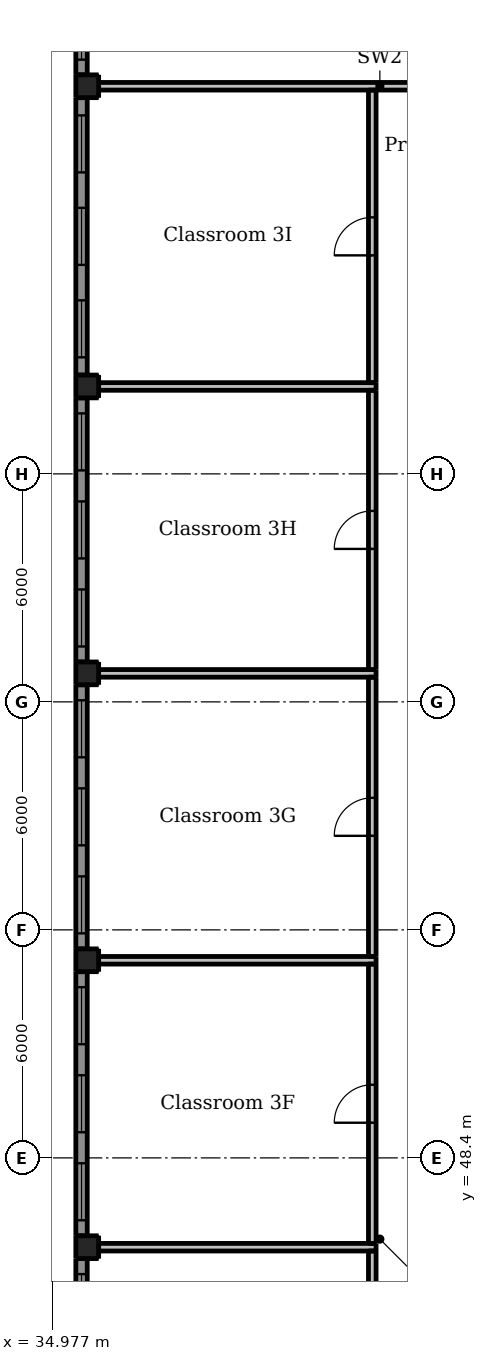
"""IFC4 building model, lengths in metres.
Left out: names, types, materials, properties, quantities, classifications, styles, units other than length and angle.
Written with IfcOpenShell. Run it as: python <this file> out.ifc"""

import sys

from ifc_helpers import new_model, si_unit, direction, frame, frame_2d, origin, origin_2d, place, context, subcontext, project, spatial, rectangle, extrude, element, fill, save


model = new_model("IFC4")
c1 = context("Model", 3, precision=1e-05, world=origin(), true_north=direction((0.0, 1.0)))
c2 = subcontext(c1, "Body", "Model", "MODEL_VIEW")
j1 = project(units=[si_unit("LENGTHUNIT", "METRE"), si_unit("PLANEANGLEUNIT", "RADIAN")], contexts=[c1])
p1 = place(None, origin())
s1 = spatial("IfcSite", under=j1, at=p1, CompositionType="ELEMENT")
p2 = place(p1, origin())
s2 = spatial("IfcBuilding", under=s1, at=p2, CompositionType="ELEMENT")
p3 = place(p2, frame((0.0, 0.0, 14.5)))
s3 = spatial("IfcBuildingStorey", under=s2, at=p3, CompositionType="ELEMENT", Elevation=14.5)
for number, where, z_axis, x_axis in (
    (1, (35.9, 46.05, -0.3), (0.0, 0.0, 1.0), (1.0, 0.0, 0.0)),
    (2, (35.9, 53.6, -0.3), (0.0, 0.0, 1.0), (1.0, 0.0, 0.0)),
    (3, (35.9, 61.15, -0.3), (0.0, 0.0, 1.0), (1.0, 0.0, 0.0)),
    (4, (35.9, 68.7, -0.3), (0.0, 0.0, 1.0), (1.0, 0.0, 0.0)),
    (5, (35.9, 76.6, -0.3), (0.0, 0.0, 1.0), (1.0, 0.0, 0.0)),
):
    element("IfcColumn", number, at=place(p3, frame(where, z_axis=z_axis, x_axis=x_axis)), inside=s3, PredefinedType="COLUMN", context=c2, shape_type="SweptSolid", body=[
        extrude(rectangle(XDim=0.6, YDim=0.6, at=origin_2d()), origin(), (0.0, 0.0, 1.0), 4.5),
    ])
p4 = place(p3, frame((35.75, 38.8, 0.0), z_axis=(0.0, 0.0, 1.0), x_axis=(0.0, 1.0, 0.0)))
e6 = element("IfcWall", 6, at=p4, inside=s3, PredefinedType="SOLIDWALL", context=c2, shape_type="SweptSolid", body=[
    extrude(rectangle(XDim=6.95, YDim=0.3, at=frame_2d((3.475, 0.0))), origin(), (0.0, 0.0, 1.0), 3.3),
])
p5 = place(p4, frame((0.408, 0.0, 0.9)))
e7 = element("IfcOpeningElement", 7, at=p5, cuts=e6, PredefinedType="OPENING", context=c2, shape_type="SweptSolid", body=[
    extrude(rectangle(XDim=1.5, YDim=1.5, at=frame_2d((0.75, 0.75))), frame((0.0, 0.16, 0.0), z_axis=(0.0, -1.0, 0.0), x_axis=(1.0, 0.0, 0.0)), (0.0, 0.0, 1.0), 0.32),
])
p6 = place(p4, frame((2.725, 0.0, 0.9)))
e8 = element("IfcOpeningElement", 8, at=p6, cuts=e6, PredefinedType="OPENING", context=c2, shape_type="SweptSolid", body=[
    extrude(rectangle(XDim=1.5, YDim=1.5, at=frame_2d((0.75, 0.75))), frame((0.0, 0.16, 0.0), z_axis=(0.0, -1.0, 0.0), x_axis=(1.0, 0.0, 0.0)), (0.0, 0.0, 1.0), 0.32),
])
p7 = place(p4, frame((5.042, 0.0, 0.9)))
e9 = element("IfcOpeningElement", 9, at=p7, cuts=e6, PredefinedType="OPENING", context=c2, shape_type="SweptSolid", body=[
    extrude(rectangle(XDim=1.5, YDim=1.5, at=frame_2d((0.75, 0.75))), frame((0.0, 0.16, 0.0), z_axis=(0.0, -1.0, 0.0), x_axis=(1.0, 0.0, 0.0)), (0.0, 0.0, 1.0), 0.32),
])
p8 = place(p3, frame((35.75, 46.35, 0.0), z_axis=(0.0, 0.0, 1.0), x_axis=(0.0, 1.0, 0.0)))
e10 = element("IfcWall", 10, at=p8, inside=s3, PredefinedType="SOLIDWALL", context=c2, shape_type="SweptSolid", body=[
    extrude(rectangle(XDim=6.95, YDim=0.3, at=frame_2d((3.475, 0.0))), origin(), (0.0, 0.0, 1.0), 3.3),
])
p9 = place(p8, frame((0.408, 0.0, 0.9)))
e11 = element("IfcOpeningElement", 11, at=p9, cuts=e10, PredefinedType="OPENING", context=c2, shape_type="SweptSolid", body=[
    extrude(rectangle(XDim=1.5, YDim=1.5, at=frame_2d((0.75, 0.75))), frame((0.0, 0.16, 0.0), z_axis=(0.0, -1.0, 0.0), x_axis=(1.0, 0.0, 0.0)), (0.0, 0.0, 1.0), 0.32),
])
p10 = place(p8, frame((2.725, 0.0, 0.9)))
e12 = element("IfcOpeningElement", 12, at=p10, cuts=e10, PredefinedType="OPENING", context=c2, shape_type="SweptSolid", body=[
    extrude(rectangle(XDim=1.5, YDim=1.5, at=frame_2d((0.75, 0.75))), frame((0.0, 0.16, 0.0), z_axis=(0.0, -1.0, 0.0), x_axis=(1.0, 0.0, 0.0)), (0.0, 0.0, 1.0), 0.32),
])
p11 = place(p8, frame((5.042, 0.0, 0.9)))
e13 = element("IfcOpeningElement", 13, at=p11, cuts=e10, PredefinedType="OPENING", context=c2, shape_type="SweptSolid", body=[
    extrude(rectangle(XDim=1.5, YDim=1.5, at=frame_2d((0.75, 0.75))), frame((0.0, 0.16, 0.0), z_axis=(0.0, -1.0, 0.0), x_axis=(1.0, 0.0, 0.0)), (0.0, 0.0, 1.0), 0.32),
])
p12 = place(p3, frame((35.75, 53.9, 0.0), z_axis=(0.0, 0.0, 1.0), x_axis=(0.0, 1.0, 0.0)))
e14 = element("IfcWall", 14, at=p12, inside=s3, PredefinedType="SOLIDWALL", context=c2, shape_type="SweptSolid", body=[
    extrude(rectangle(XDim=6.95, YDim=0.3, at=frame_2d((3.475, 0.0))), origin(), (0.0, 0.0, 1.0), 3.3),
])
p13 = place(p12, frame((0.408, 0.0, 0.9)))
e15 = element("IfcOpeningElement", 15, at=p13, cuts=e14, PredefinedType="OPENING", context=c2, shape_type="SweptSolid", body=[
    extrude(rectangle(XDim=1.5, YDim=1.5, at=frame_2d((0.75, 0.75))), frame((0.0, 0.16, 0.0), z_axis=(0.0, -1.0, 0.0), x_axis=(1.0, 0.0, 0.0)), (0.0, 0.0, 1.0), 0.32),
])
p14 = place(p12, frame((2.725, 0.0, 0.9)))
e16 = element("IfcOpeningElement", 16, at=p14, cuts=e14, PredefinedType="OPENING", context=c2, shape_type="SweptSolid", body=[
    extrude(rectangle(XDim=1.5, YDim=1.5, at=frame_2d((0.75, 0.75))), frame((0.0, 0.16, 0.0), z_axis=(0.0, -1.0, 0.0), x_axis=(1.0, 0.0, 0.0)), (0.0, 0.0, 1.0), 0.32),
])
p15 = place(p12, frame((5.042, 0.0, 0.9)))
e17 = element("IfcOpeningElement", 17, at=p15, cuts=e14, PredefinedType="OPENING", context=c2, shape_type="SweptSolid", body=[
    extrude(rectangle(XDim=1.5, YDim=1.5, at=frame_2d((0.75, 0.75))), frame((0.0, 0.16, 0.0), z_axis=(0.0, -1.0, 0.0), x_axis=(1.0, 0.0, 0.0)), (0.0, 0.0, 1.0), 0.32),
])
p16 = place(p3, frame((35.75, 61.45, 0.0), z_axis=(0.0, 0.0, 1.0), x_axis=(0.0, 1.0, 0.0)))
e18 = element("IfcWall", 18, at=p16, inside=s3, PredefinedType="SOLIDWALL", context=c2, shape_type="SweptSolid", body=[
    extrude(rectangle(XDim=6.95, YDim=0.3, at=frame_2d((3.475, 0.0))), origin(), (0.0, 0.0, 1.0), 3.3),
])
p17 = place(p16, frame((0.408, 0.0, 0.9)))
e19 = element("IfcOpeningElement", 19, at=p17, cuts=e18, PredefinedType="OPENING", context=c2, shape_type="SweptSolid", body=[
    extrude(rectangle(XDim=1.5, YDim=1.5, at=frame_2d((0.75, 0.75))), frame((0.0, 0.16, 0.0), z_axis=(0.0, -1.0, 0.0), x_axis=(1.0, 0.0, 0.0)), (0.0, 0.0, 1.0), 0.32),
])
p18 = place(p16, frame((2.725, 0.0, 0.9)))
e20 = element("IfcOpeningElement", 20, at=p18, cuts=e18, PredefinedType="OPENING", context=c2, shape_type="SweptSolid", body=[
    extrude(rectangle(XDim=1.5, YDim=1.5, at=frame_2d((0.75, 0.75))), frame((0.0, 0.16, 0.0), z_axis=(0.0, -1.0, 0.0), x_axis=(1.0, 0.0, 0.0)), (0.0, 0.0, 1.0), 0.32),
])
p19 = place(p16, frame((5.042, 0.0, 0.9)))
e21 = element("IfcOpeningElement", 21, at=p19, cuts=e18, PredefinedType="OPENING", context=c2, shape_type="SweptSolid", body=[
    extrude(rectangle(XDim=1.5, YDim=1.5, at=frame_2d((0.75, 0.75))), frame((0.0, 0.16, 0.0), z_axis=(0.0, -1.0, 0.0), x_axis=(1.0, 0.0, 0.0)), (0.0, 0.0, 1.0), 0.32),
])
p20 = place(p3, frame((35.75, 69.0, 0.0), z_axis=(0.0, 0.0, 1.0), x_axis=(0.0, 1.0, 0.0)))
e22 = element("IfcWall", 22, at=p20, inside=s3, PredefinedType="SOLIDWALL", context=c2, shape_type="SweptSolid", body=[
    extrude(rectangle(XDim=7.3, YDim=0.3, at=frame_2d((3.65, 0.0))), origin(), (0.0, 0.0, 1.0), 3.3),
])
p21 = place(p20, frame((0.467, 0.0, 0.9)))
e23 = element("IfcOpeningElement", 23, at=p21, cuts=e22, PredefinedType="OPENING", context=c2, shape_type="SweptSolid", body=[
    extrude(rectangle(XDim=1.5, YDim=1.5, at=frame_2d((0.75, 0.75))), frame((0.0, 0.16, 0.0), z_axis=(0.0, -1.0, 0.0), x_axis=(1.0, 0.0, 0.0)), (0.0, 0.0, 1.0), 0.32),
])
p22 = place(p20, frame((2.9, 0.0, 0.9)))
e24 = element("IfcOpeningElement", 24, at=p22, cuts=e22, PredefinedType="OPENING", context=c2, shape_type="SweptSolid", body=[
    extrude(rectangle(XDim=1.5, YDim=1.5, at=frame_2d((0.75, 0.75))), frame((0.0, 0.16, 0.0), z_axis=(0.0, -1.0, 0.0), x_axis=(1.0, 0.0, 0.0)), (0.0, 0.0, 1.0), 0.32),
])
p23 = place(p20, frame((5.333, 0.0, 0.9)))
e25 = element("IfcOpeningElement", 25, at=p23, cuts=e22, PredefinedType="OPENING", context=c2, shape_type="SweptSolid", body=[
    extrude(rectangle(XDim=1.5, YDim=1.5, at=frame_2d((0.75, 0.75))), frame((0.0, 0.16, 0.0), z_axis=(0.0, -1.0, 0.0), x_axis=(1.0, 0.0, 0.0)), (0.0, 0.0, 1.0), 0.32),
])
p24 = place(p3, frame((35.75, 76.9, 0.0), z_axis=(0.0, 0.0, 1.0), x_axis=(0.0, 1.0, 0.0)))
e26 = element("IfcWall", 26, at=p24, inside=s3, PredefinedType="SOLIDWALL", context=c2, shape_type="SweptSolid", body=[
    extrude(rectangle(XDim=6.9, YDim=0.3, at=frame_2d((3.45, 0.0))), origin(), (0.0, 0.0, 1.0), 3.3),
])
p25 = place(p24, frame((0.4, 0.0, 0.9)))
e27 = element("IfcOpeningElement", 27, at=p25, cuts=e26, PredefinedType="OPENING", context=c2, shape_type="SweptSolid", body=[
    extrude(rectangle(XDim=1.5, YDim=1.5, at=frame_2d((0.75, 0.75))), frame((0.0, 0.16, 0.0), z_axis=(0.0, -1.0, 0.0), x_axis=(1.0, 0.0, 0.0)), (0.0, 0.0, 1.0), 0.32),
])
p26 = place(p24, frame((2.7, 0.0, 0.9)))
e28 = element("IfcOpeningElement", 28, at=p26, cuts=e26, PredefinedType="OPENING", context=c2, shape_type="SweptSolid", body=[
    extrude(rectangle(XDim=1.5, YDim=1.5, at=frame_2d((0.75, 0.75))), frame((0.0, 0.16, 0.0), z_axis=(0.0, -1.0, 0.0), x_axis=(1.0, 0.0, 0.0)), (0.0, 0.0, 1.0), 0.32),
])
p27 = place(p24, frame((5.0, 0.0, 0.9)))
e29 = element("IfcOpeningElement", 29, at=p27, cuts=e26, PredefinedType="OPENING", context=c2, shape_type="SweptSolid", body=[
    extrude(rectangle(XDim=1.5, YDim=1.5, at=frame_2d((0.75, 0.75))), frame((0.0, 0.16, 0.0), z_axis=(0.0, -1.0, 0.0), x_axis=(1.0, 0.0, 0.0)), (0.0, 0.0, 1.0), 0.32),
])
p28 = place(p3, frame((43.4, 38.6, 0.0), z_axis=(0.0, 0.0, 1.0), x_axis=(0.0, 1.0, 0.0)))
e30 = element("IfcWall", 30, at=p28, inside=s3, PredefinedType="PARTITIONING", context=c2, shape_type="SweptSolid", body=[
    extrude(rectangle(XDim=7.35, YDim=0.2, at=frame_2d((3.675, 0.0))), origin(), (0.0, 0.0, 1.0), 3.1),
])
p29 = place(p28, frame((3.175, 0.0, 0.0)))
e31 = element("IfcOpeningElement", 31, at=p29, cuts=e30, PredefinedType="OPENING", context=c2, shape_type="SweptSolid", body=[
    extrude(rectangle(XDim=1.0, YDim=2.1, at=frame_2d((0.5, 1.05))), frame((0.0, 0.11, 0.0), z_axis=(0.0, -1.0, 0.0), x_axis=(1.0, 0.0, 0.0)), (0.0, 0.0, 1.0), 0.22),
])
p30 = place(p3, frame((43.4, 46.15, 0.0), z_axis=(0.0, 0.0, 1.0), x_axis=(0.0, 1.0, 0.0)))
e32 = element("IfcWall", 32, at=p30, inside=s3, PredefinedType="PARTITIONING", context=c2, shape_type="SweptSolid", body=[
    extrude(rectangle(XDim=7.35, YDim=0.2, at=frame_2d((3.675, 0.0))), origin(), (0.0, 0.0, 1.0), 3.1),
])
p31 = place(p30, frame((3.175, 0.0, 0.0)))
e33 = element("IfcOpeningElement", 33, at=p31, cuts=e32, PredefinedType="OPENING", context=c2, shape_type="SweptSolid", body=[
    extrude(rectangle(XDim=1.0, YDim=2.1, at=frame_2d((0.5, 1.05))), frame((0.0, 0.11, 0.0), z_axis=(0.0, -1.0, 0.0), x_axis=(1.0, 0.0, 0.0)), (0.0, 0.0, 1.0), 0.22),
])
p32 = place(p3, frame((43.4, 53.7, 0.0), z_axis=(0.0, 0.0, 1.0), x_axis=(0.0, 1.0, 0.0)))
e34 = element("IfcWall", 34, at=p32, inside=s3, PredefinedType="PARTITIONING", context=c2, shape_type="SweptSolid", body=[
    extrude(rectangle(XDim=7.35, YDim=0.2, at=frame_2d((3.675, 0.0))), origin(), (0.0, 0.0, 1.0), 3.1),
])
p33 = place(p32, frame((3.175, 0.0, 0.0)))
e35 = element("IfcOpeningElement", 35, at=p33, cuts=e34, PredefinedType="OPENING", context=c2, shape_type="SweptSolid", body=[
    extrude(rectangle(XDim=1.0, YDim=2.1, at=frame_2d((0.5, 1.05))), frame((0.0, 0.11, 0.0), z_axis=(0.0, -1.0, 0.0), x_axis=(1.0, 0.0, 0.0)), (0.0, 0.0, 1.0), 0.22),
])
p34 = place(p3, frame((43.4, 61.25, 0.0), z_axis=(0.0, 0.0, 1.0), x_axis=(0.0, 1.0, 0.0)))
e36 = element("IfcWall", 36, at=p34, inside=s3, PredefinedType="PARTITIONING", context=c2, shape_type="SweptSolid", body=[
    extrude(rectangle(XDim=7.35, YDim=0.2, at=frame_2d((3.675, 0.0))), origin(), (0.0, 0.0, 1.0), 3.1),
])
p35 = place(p34, frame((3.175, 0.0, 0.0)))
e37 = element("IfcOpeningElement", 37, at=p35, cuts=e36, PredefinedType="OPENING", context=c2, shape_type="SweptSolid", body=[
    extrude(rectangle(XDim=1.0, YDim=2.1, at=frame_2d((0.5, 1.05))), frame((0.0, 0.11, 0.0), z_axis=(0.0, -1.0, 0.0), x_axis=(1.0, 0.0, 0.0)), (0.0, 0.0, 1.0), 0.22),
])
p36 = place(p3, frame((43.4, 68.8, 0.0), z_axis=(0.0, 0.0, 1.0), x_axis=(0.0, 1.0, 0.0)))
e38 = element("IfcWall", 38, at=p36, inside=s3, PredefinedType="PARTITIONING", context=c2, shape_type="SweptSolid", body=[
    extrude(rectangle(XDim=7.7, YDim=0.2, at=frame_2d((3.85, 0.0))), origin(), (0.0, 0.0, 1.0), 3.1),
])
p37 = place(p36, frame((3.35, 0.0, 0.0)))
e39 = element("IfcOpeningElement", 39, at=p37, cuts=e38, PredefinedType="OPENING", context=c2, shape_type="SweptSolid", body=[
    extrude(rectangle(XDim=1.0, YDim=2.1, at=frame_2d((0.5, 1.05))), frame((0.0, 0.11, 0.0), z_axis=(0.0, -1.0, 0.0), x_axis=(1.0, 0.0, 0.0)), (0.0, 0.0, 1.0), 0.22),
])
for number, where, z_axis, x_axis in (
    (40, (36.2, 46.05, 0.0), (0.0, 0.0, 1.0), (1.0, 0.0, 0.0)),
    (41, (36.2, 53.6, 0.0), (0.0, 0.0, 1.0), (1.0, 0.0, 0.0)),
    (42, (36.2, 61.15, 0.0), (0.0, 0.0, 1.0), (1.0, 0.0, 0.0)),
    (43, (36.2, 68.7, 0.0), (0.0, 0.0, 1.0), (1.0, 0.0, 0.0)),
):
    element("IfcWall", number, at=place(p3, frame(where, z_axis=z_axis, x_axis=x_axis)), inside=s3, PredefinedType="PARTITIONING", context=c2, shape_type="SweptSolid", body=[
        extrude(rectangle(XDim=7.3, YDim=0.2, at=frame_2d((3.65, 0.0))), origin(), (0.0, 0.0, 1.0), 3.1),
    ])
p38 = place(p3, frame((36.2, 76.6, 0.0), z_axis=(0.0, 0.0, 1.0), x_axis=(1.0, 0.0, 0.0)))
e44 = element("IfcWall", 44, at=p38, inside=s3, PredefinedType="PARTITIONING", context=c2, shape_type="SweptSolid", body=[
    extrude(rectangle(XDim=14.8, YDim=0.2, at=frame_2d((7.4, 0.0))), origin(), (0.0, 0.0, 1.0), 3.1),
])
p39 = place(p38, frame((11.1, 0.0, 0.0)))
e45 = element("IfcOpeningElement", 45, at=p39, cuts=e44, PredefinedType="OPENING", context=c2, shape_type="SweptSolid", body=[
    extrude(rectangle(XDim=1.0, YDim=2.1, at=frame_2d((0.5, 1.05))), frame((0.0, 0.11, 0.0), z_axis=(0.0, -1.0, 0.0), x_axis=(1.0, 0.0, 0.0)), (0.0, 0.0, 1.0), 0.22),
])
p40 = place(p7, origin())
e46 = element("IfcWindow", 46, at=p40, inside=s3, PartitioningType="DOUBLE_PANEL_HORIZONTAL", PredefinedType="WINDOW", context=c2, shape_type="SweptSolid", body=[
    extrude(rectangle(XDim=1.5, YDim=1.5, at=frame_2d((0.75, 0.75))), frame((0.0, 0.03, 0.0), z_axis=(0.0, -1.0, 0.0), x_axis=(1.0, 0.0, 0.0)), (0.0, 0.0, 1.0), 0.06),
])
fill(e9, e46)
p41 = place(p9, origin())
e47 = element("IfcWindow", 47, at=p41, inside=s3, PartitioningType="DOUBLE_PANEL_HORIZONTAL", PredefinedType="WINDOW", context=c2, shape_type="SweptSolid", body=[
    extrude(rectangle(XDim=1.5, YDim=1.5, at=frame_2d((0.75, 0.75))), frame((0.0, 0.03, 0.0), z_axis=(0.0, -1.0, 0.0), x_axis=(1.0, 0.0, 0.0)), (0.0, 0.0, 1.0), 0.06),
])
fill(e11, e47)
p42 = place(p10, origin())
e48 = element("IfcWindow", 48, at=p42, inside=s3, PartitioningType="DOUBLE_PANEL_HORIZONTAL", PredefinedType="WINDOW", context=c2, shape_type="SweptSolid", body=[
    extrude(rectangle(XDim=1.5, YDim=1.5, at=frame_2d((0.75, 0.75))), frame((0.0, 0.03, 0.0), z_axis=(0.0, -1.0, 0.0), x_axis=(1.0, 0.0, 0.0)), (0.0, 0.0, 1.0), 0.06),
])
fill(e12, e48)
p43 = place(p11, origin())
e49 = element("IfcWindow", 49, at=p43, inside=s3, PartitioningType="DOUBLE_PANEL_HORIZONTAL", PredefinedType="WINDOW", context=c2, shape_type="SweptSolid", body=[
    extrude(rectangle(XDim=1.5, YDim=1.5, at=frame_2d((0.75, 0.75))), frame((0.0, 0.03, 0.0), z_axis=(0.0, -1.0, 0.0), x_axis=(1.0, 0.0, 0.0)), (0.0, 0.0, 1.0), 0.06),
])
fill(e13, e49)
p44 = place(p13, origin())
e50 = element("IfcWindow", 50, at=p44, inside=s3, PartitioningType="DOUBLE_PANEL_HORIZONTAL", PredefinedType="WINDOW", context=c2, shape_type="SweptSolid", body=[
    extrude(rectangle(XDim=1.5, YDim=1.5, at=frame_2d((0.75, 0.75))), frame((0.0, 0.03, 0.0), z_axis=(0.0, -1.0, 0.0), x_axis=(1.0, 0.0, 0.0)), (0.0, 0.0, 1.0), 0.06),
])
fill(e15, e50)
p45 = place(p14, origin())
e51 = element("IfcWindow", 51, at=p45, inside=s3, PartitioningType="DOUBLE_PANEL_HORIZONTAL", PredefinedType="WINDOW", context=c2, shape_type="SweptSolid", body=[
    extrude(rectangle(XDim=1.5, YDim=1.5, at=frame_2d((0.75, 0.75))), frame((0.0, 0.03, 0.0), z_axis=(0.0, -1.0, 0.0), x_axis=(1.0, 0.0, 0.0)), (0.0, 0.0, 1.0), 0.06),
])
fill(e16, e51)
p46 = place(p15, origin())
e52 = element("IfcWindow", 52, at=p46, inside=s3, PartitioningType="DOUBLE_PANEL_HORIZONTAL", PredefinedType="WINDOW", context=c2, shape_type="SweptSolid", body=[
    extrude(rectangle(XDim=1.5, YDim=1.5, at=frame_2d((0.75, 0.75))), frame((0.0, 0.03, 0.0), z_axis=(0.0, -1.0, 0.0), x_axis=(1.0, 0.0, 0.0)), (0.0, 0.0, 1.0), 0.06),
])
fill(e17, e52)
p47 = place(p17, origin())
e53 = element("IfcWindow", 53, at=p47, inside=s3, PartitioningType="DOUBLE_PANEL_HORIZONTAL", PredefinedType="WINDOW", context=c2, shape_type="SweptSolid", body=[
    extrude(rectangle(XDim=1.5, YDim=1.5, at=frame_2d((0.75, 0.75))), frame((0.0, 0.03, 0.0), z_axis=(0.0, -1.0, 0.0), x_axis=(1.0, 0.0, 0.0)), (0.0, 0.0, 1.0), 0.06),
])
fill(e19, e53)
p48 = place(p18, origin())
e54 = element("IfcWindow", 54, at=p48, inside=s3, PartitioningType="DOUBLE_PANEL_HORIZONTAL", PredefinedType="WINDOW", context=c2, shape_type="SweptSolid", body=[
    extrude(rectangle(XDim=1.5, YDim=1.5, at=frame_2d((0.75, 0.75))), frame((0.0, 0.03, 0.0), z_axis=(0.0, -1.0, 0.0), x_axis=(1.0, 0.0, 0.0)), (0.0, 0.0, 1.0), 0.06),
])
fill(e20, e54)
p49 = place(p19, origin())
e55 = element("IfcWindow", 55, at=p49, inside=s3, PartitioningType="DOUBLE_PANEL_HORIZONTAL", PredefinedType="WINDOW", context=c2, shape_type="SweptSolid", body=[
    extrude(rectangle(XDim=1.5, YDim=1.5, at=frame_2d((0.75, 0.75))), frame((0.0, 0.03, 0.0), z_axis=(0.0, -1.0, 0.0), x_axis=(1.0, 0.0, 0.0)), (0.0, 0.0, 1.0), 0.06),
])
fill(e21, e55)
p50 = place(p21, origin())
e56 = element("IfcWindow", 56, at=p50, inside=s3, PartitioningType="DOUBLE_PANEL_HORIZONTAL", PredefinedType="WINDOW", context=c2, shape_type="SweptSolid", body=[
    extrude(rectangle(XDim=1.5, YDim=1.5, at=frame_2d((0.75, 0.75))), frame((0.0, 0.03, 0.0), z_axis=(0.0, -1.0, 0.0), x_axis=(1.0, 0.0, 0.0)), (0.0, 0.0, 1.0), 0.06),
])
fill(e23, e56)
p51 = place(p22, origin())
e57 = element("IfcWindow", 57, at=p51, inside=s3, PartitioningType="DOUBLE_PANEL_HORIZONTAL", PredefinedType="WINDOW", context=c2, shape_type="SweptSolid", body=[
    extrude(rectangle(XDim=1.5, YDim=1.5, at=frame_2d((0.75, 0.75))), frame((0.0, 0.03, 0.0), z_axis=(0.0, -1.0, 0.0), x_axis=(1.0, 0.0, 0.0)), (0.0, 0.0, 1.0), 0.06),
])
fill(e24, e57)
p52 = place(p23, origin())
e58 = element("IfcWindow", 58, at=p52, inside=s3, PartitioningType="DOUBLE_PANEL_HORIZONTAL", PredefinedType="WINDOW", context=c2, shape_type="SweptSolid", body=[
    extrude(rectangle(XDim=1.5, YDim=1.5, at=frame_2d((0.75, 0.75))), frame((0.0, 0.03, 0.0), z_axis=(0.0, -1.0, 0.0), x_axis=(1.0, 0.0, 0.0)), (0.0, 0.0, 1.0), 0.06),
])
fill(e25, e58)
p53 = place(p25, origin())
e59 = element("IfcWindow", 59, at=p53, inside=s3, PartitioningType="DOUBLE_PANEL_HORIZONTAL", PredefinedType="WINDOW", context=c2, shape_type="SweptSolid", body=[
    extrude(rectangle(XDim=1.5, YDim=1.5, at=frame_2d((0.75, 0.75))), frame((0.0, 0.03, 0.0), z_axis=(0.0, -1.0, 0.0), x_axis=(1.0, 0.0, 0.0)), (0.0, 0.0, 1.0), 0.06),
])
fill(e27, e59)
p54 = place(p31, origin())
e60 = element("IfcDoor", 60, at=p54, inside=s3, OperationType="SINGLE_SWING_LEFT", PredefinedType="DOOR", context=c2, shape_type="SweptSolid", body=[
    extrude(rectangle(XDim=1.0, YDim=2.1, at=frame_2d((0.5, 1.05))), frame((0.0, 0.025, 0.0), z_axis=(0.0, -1.0, 0.0), x_axis=(1.0, 0.0, 0.0)), (0.0, 0.0, 1.0), 0.05),
])
fill(e33, e60)
p55 = place(p33, origin())
e61 = element("IfcDoor", 61, at=p55, inside=s3, OperationType="SINGLE_SWING_LEFT", PredefinedType="DOOR", context=c2, shape_type="SweptSolid", body=[
    extrude(rectangle(XDim=1.0, YDim=2.1, at=frame_2d((0.5, 1.05))), frame((0.0, 0.025, 0.0), z_axis=(0.0, -1.0, 0.0), x_axis=(1.0, 0.0, 0.0)), (0.0, 0.0, 1.0), 0.05),
])
fill(e35, e61)
p56 = place(p35, origin())
e62 = element("IfcDoor", 62, at=p56, inside=s3, OperationType="SINGLE_SWING_LEFT", PredefinedType="DOOR", context=c2, shape_type="SweptSolid", body=[
    extrude(rectangle(XDim=1.0, YDim=2.1, at=frame_2d((0.5, 1.05))), frame((0.0, 0.025, 0.0), z_axis=(0.0, -1.0, 0.0), x_axis=(1.0, 0.0, 0.0)), (0.0, 0.0, 1.0), 0.05),
])
fill(e37, e62)
p57 = place(p37, origin())
e63 = element("IfcDoor", 63, at=p57, inside=s3, OperationType="SINGLE_SWING_LEFT", PredefinedType="DOOR", context=c2, shape_type="SweptSolid", body=[
    extrude(rectangle(XDim=1.0, YDim=2.1, at=frame_2d((0.5, 1.05))), frame((0.0, 0.025, 0.0), z_axis=(0.0, -1.0, 0.0), x_axis=(1.0, 0.0, 0.0)), (0.0, 0.0, 1.0), 0.05),
])
fill(e39, e63)
save(model, sys.argv[1])
